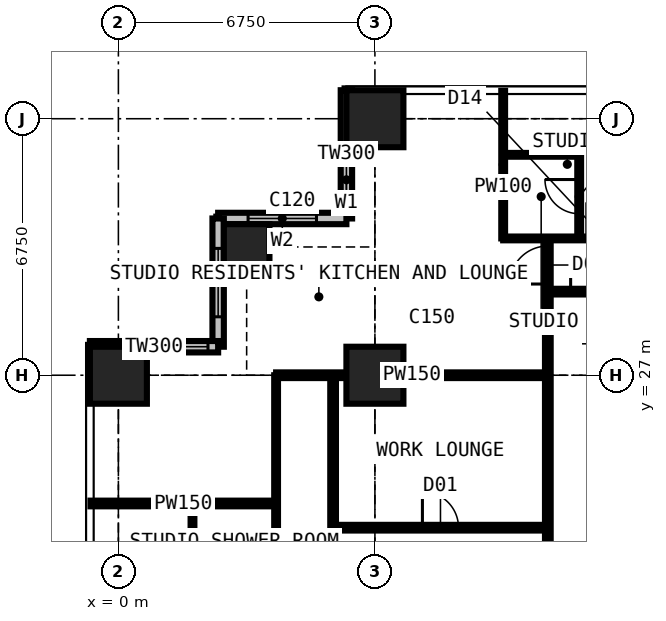
"""IFC4 building model, lengths in metres.
Left out: names, types, materials, properties, quantities, classifications, styles, units other than length and angle.
Written with IfcOpenShell. Run it as: python <this file> out.ifc"""

import sys

from ifc_helpers import new_model, si_unit, direction, frame, frame_2d, origin, origin_2d, place, context, subcontext, project, spatial, rectangle, extrude, element, fill, save


model = new_model("IFC4")
c1 = context("Model", 3, precision=1e-05, world=origin(), true_north=direction((0.0, 1.0)))
c2 = subcontext(c1, "Body", "Model", "MODEL_VIEW")
j1 = project(units=[si_unit("LENGTHUNIT", "METRE"), si_unit("PLANEANGLEUNIT", "RADIAN")], contexts=[c1])
p1 = place(None, origin())
s1 = spatial("IfcSite", under=j1, at=p1, CompositionType="ELEMENT")
p2 = place(p1, origin())
s2 = spatial("IfcBuilding", under=s1, at=p2, CompositionType="ELEMENT")
p3 = place(p2, frame((0.0, 0.0, 160.2)))
s3 = spatial("IfcBuildingStorey", under=s2, at=p3, CompositionType="ELEMENT", Elevation=160.2)
p4 = place(p3, frame((0.0, 27.0, 0.0), z_axis=(0.0, 0.0, 1.0), x_axis=(1.0, 0.0, 0.0)))
e1 = element("IfcColumn", 1, at=p4, inside=s3, PredefinedType="COLUMN", context=c2, shape_type="SweptSolid", body=[
    extrude(rectangle(XDim=1.5, YDim=1.5, at=origin_2d()), origin(), (0.0, 0.0, 1.0), 3.6),
])
p5 = place(p3, frame((3.375, 30.375, 0.0), z_axis=(0.0, 0.0, 1.0), x_axis=(1.0, 0.0, 0.0)))
e2 = element("IfcColumn", 2, at=p5, inside=s3, PredefinedType="COLUMN", context=c2, shape_type="SweptSolid", body=[
    extrude(rectangle(XDim=1.2, YDim=1.2, at=origin_2d()), origin(), (0.0, 0.0, 1.0), 3.6),
])
for number, where, z_axis, x_axis in (
    (3, (6.75, 27.0, 0.0), (0.0, 0.0, 1.0), (1.0, 0.0, 0.0)),
    (4, (6.75, 33.75, 0.0), (0.0, 0.0, 1.0), (1.0, 0.0, 0.0)),
):
    element("IfcColumn", number, at=place(p3, frame(where, z_axis=z_axis, x_axis=x_axis)), inside=s3, PredefinedType="COLUMN", context=c2, shape_type="SweptSolid", body=[
        extrude(rectangle(XDim=1.5, YDim=1.5, at=origin_2d()), origin(), (0.0, 0.0, 1.0), 3.6),
    ])
p6 = place(p3, frame((6.0, 34.5, 0.0), z_axis=(0.0, 0.0, 1.0), x_axis=(0.0, -1.0, 0.0)))
e5 = element("IfcWall", 5, at=p6, inside=s3, PredefinedType="SOLIDWALL", context=c2, shape_type="SweptSolid", body=[
    extrude(rectangle(XDim=3.375, YDim=0.3, at=frame_2d((1.688, 0.0))), origin(), (0.0, 0.0, 1.0), 3.375),
])
p7 = place(p6, frame((1.607, 0.0, 0.9)))
e6 = element("IfcOpeningElement", 6, at=p7, cuts=e5, PredefinedType="OPENING", context=c2, shape_type="SweptSolid", body=[
    extrude(rectangle(XDim=1.5, YDim=1.8, at=frame_2d((0.75, 0.9))), frame((0.0, 0.16, 0.0), z_axis=(0.0, -1.0, 0.0), x_axis=(1.0, 0.0, 0.0)), (0.0, 0.0, 1.0), 0.32),
])
p8 = place(p3, frame((6.0, 31.125, 0.0), z_axis=(0.0, 0.0, 1.0), x_axis=(-1.0, 0.0, 0.0)))
e7 = element("IfcWall", 7, at=p8, inside=s3, PredefinedType="SOLIDWALL", context=c2, shape_type="SweptSolid", body=[
    extrude(rectangle(XDim=3.375, YDim=0.3, at=frame_2d((1.688, 0.0))), origin(), (0.0, 0.0, 1.0), 3.375),
])
p9 = place(p8, frame((0.788, 0.0, 0.6)))
e8 = element("IfcOpeningElement", 8, at=p9, cuts=e7, PredefinedType="OPENING", context=c2, shape_type="SweptSolid", body=[
    extrude(rectangle(XDim=1.8, YDim=2.1, at=frame_2d((0.9, 1.05))), frame((0.0, 0.16, 0.0), z_axis=(0.0, -1.0, 0.0), x_axis=(1.0, 0.0, 0.0)), (0.0, 0.0, 1.0), 0.32),
])
p10 = place(p3, frame((2.625, 31.125, 0.0), z_axis=(0.0, 0.0, 1.0), x_axis=(0.0, -1.0, 0.0)))
e9 = element("IfcWall", 9, at=p10, inside=s3, PredefinedType="SOLIDWALL", context=c2, shape_type="SweptSolid", body=[
    extrude(rectangle(XDim=3.375, YDim=0.3, at=frame_2d((1.688, 0.0))), origin(), (0.0, 0.0, 1.0), 3.375),
])
p11 = place(p10, frame((0.788, 0.0, 0.6)))
e10 = element("IfcOpeningElement", 10, at=p11, cuts=e9, PredefinedType="OPENING", context=c2, shape_type="SweptSolid", body=[
    extrude(rectangle(XDim=1.8, YDim=2.1, at=frame_2d((0.9, 1.05))), frame((0.0, 0.16, 0.0), z_axis=(0.0, -1.0, 0.0), x_axis=(1.0, 0.0, 0.0)), (0.0, 0.0, 1.0), 0.32),
])
p12 = place(p3, frame((2.625, 27.75, 0.0), z_axis=(0.0, 0.0, 1.0), x_axis=(-1.0, 0.0, 0.0)))
e11 = element("IfcWall", 11, at=p12, inside=s3, PredefinedType="SOLIDWALL", context=c2, shape_type="SweptSolid", body=[
    extrude(rectangle(XDim=3.375, YDim=0.3, at=frame_2d((1.688, 0.0))), origin(), (0.0, 0.0, 1.0), 3.375),
])
p13 = place(p12, frame((0.268, 0.0, 0.9)))
e12 = element("IfcOpeningElement", 12, at=p13, cuts=e11, PredefinedType="OPENING", context=c2, shape_type="SweptSolid", body=[
    extrude(rectangle(XDim=1.5, YDim=1.8, at=frame_2d((0.75, 0.9))), frame((0.0, 0.16, 0.0), z_axis=(0.0, -1.0, 0.0), x_axis=(1.0, 0.0, 0.0)), (0.0, 0.0, 1.0), 0.32),
])
p14 = place(p3, frame((-0.734, 23.625, 0.0), z_axis=(0.0, 0.0, 1.0), x_axis=(1.0, 0.0, 0.0)))
e13 = element("IfcWall", 13, at=p14, inside=s3, PredefinedType="PARTITIONING", context=c2, shape_type="SweptSolid", body=[
    extrude(rectangle(XDim=4.884, YDim=0.15, at=frame_2d((2.442, 0.0))), origin(), (0.0, 0.0, 1.0), 3.375),
])
p15 = place(p3, frame((1.95, 21.625, 0.0), z_axis=(0.0, 0.0, 1.0), x_axis=(0.0, 1.0, 0.0)))
e14 = element("IfcWall", 14, at=p15, inside=s3, PredefinedType="PARTITIONING", context=c2, shape_type="SweptSolid", body=[
    extrude(rectangle(XDim=2.0, YDim=0.1, at=frame_2d((1.0, 0.0))), origin(), (0.0, 0.0, 1.0), 3.375),
])
p16 = place(p3, frame((4.15, 10.125, 0.0), z_axis=(0.0, 0.0, 1.0), x_axis=(0.0, 1.0, 0.0)))
e15 = element("IfcWall", 15, at=p16, inside=s3, PredefinedType="PARTITIONING", context=c2, shape_type="SweptSolid", body=[
    extrude(rectangle(XDim=16.875, YDim=0.1, at=frame_2d((8.438, 0.0))), origin(), (0.0, 0.0, 1.0), 3.375),
])
p17 = place(p16, frame((0.2, 0.0, 0.0)))
e16 = element("IfcOpeningElement", 16, at=p17, cuts=e15, PredefinedType="OPENING", context=c2, shape_type="SweptSolid", body=[
    extrude(rectangle(XDim=0.95, YDim=2.2, at=frame_2d((0.475, 1.1))), frame((0.0, 0.06, 0.0), z_axis=(0.0, -1.0, 0.0), x_axis=(1.0, 0.0, 0.0)), (0.0, 0.0, 1.0), 0.12),
])
p18 = place(p16, frame((3.625, 0.0, 0.0)))
e17 = element("IfcOpeningElement", 17, at=p18, cuts=e15, PredefinedType="OPENING", context=c2, shape_type="SweptSolid", body=[
    extrude(rectangle(XDim=0.95, YDim=2.2, at=frame_2d((0.475, 1.1))), frame((0.0, 0.06, 0.0), z_axis=(0.0, -1.0, 0.0), x_axis=(1.0, 0.0, 0.0)), (0.0, 0.0, 1.0), 0.12),
])
p19 = place(p16, frame((7.0, 0.0, 0.0)))
e18 = element("IfcOpeningElement", 18, at=p19, cuts=e15, PredefinedType="OPENING", context=c2, shape_type="SweptSolid", body=[
    extrude(rectangle(XDim=0.95, YDim=2.2, at=frame_2d((0.475, 1.1))), frame((0.0, 0.06, 0.0), z_axis=(0.0, -1.0, 0.0), x_axis=(1.0, 0.0, 0.0)), (0.0, 0.0, 1.0), 0.12),
])
p20 = place(p16, frame((10.375, 0.0, 0.0)))
e19 = element("IfcOpeningElement", 19, at=p20, cuts=e15, PredefinedType="OPENING", context=c2, shape_type="SweptSolid", body=[
    extrude(rectangle(XDim=0.95, YDim=2.2, at=frame_2d((0.475, 1.1))), frame((0.0, 0.06, 0.0), z_axis=(0.0, -1.0, 0.0), x_axis=(1.0, 0.0, 0.0)), (0.0, 0.0, 1.0), 0.12),
])
p21 = place(p3, frame((4.15, 27.0, 0.0), z_axis=(0.0, 0.0, 1.0), x_axis=(1.0, 0.0, 0.0)))
e20 = element("IfcWall", 20, at=p21, inside=s3, PredefinedType="PARTITIONING", context=c2, shape_type="SweptSolid", body=[
    extrude(rectangle(XDim=7.15, YDim=0.15, at=frame_2d((3.575, 0.0))), origin(), (0.0, 0.0, 1.0), 2.806),
])
p22 = place(p3, frame((5.65, 22.988, 0.0), z_axis=(0.0, 0.0, 1.0), x_axis=(0.0, 1.0, 0.0)))
e21 = element("IfcWall", 21, at=p22, inside=s3, PredefinedType="PARTITIONING", context=c2, shape_type="SweptSolid", body=[
    extrude(rectangle(XDim=4.012, YDim=0.15, at=frame_2d((2.006, 0.0))), origin(), (0.0, 0.0, 1.0), 3.375),
])
p23 = place(p3, frame((5.65, 22.988, 0.0), z_axis=(0.0, 0.0, 1.0), x_axis=(1.0, 0.0, 0.0)))
e22 = element("IfcWall", 22, at=p23, inside=s3, PredefinedType="PARTITIONING", context=c2, shape_type="SweptSolid", body=[
    extrude(rectangle(XDim=5.65, YDim=0.15, at=frame_2d((2.825, 0.0))), origin(), (0.0, 0.0, 1.0), 3.375),
])
p24 = place(p23, frame((2.35, 0.0, 0.0)))
e23 = element("IfcOpeningElement", 23, at=p24, cuts=e22, PredefinedType="OPENING", context=c2, shape_type="SweptSolid", body=[
    extrude(rectangle(XDim=0.95, YDim=2.2, at=frame_2d((0.475, 1.1))), frame((0.0, 0.085, 0.0), z_axis=(0.0, -1.0, 0.0), x_axis=(1.0, 0.0, 0.0)), (0.0, 0.0, 1.0), 0.17),
])
p25 = place(p3, frame((10.125, 30.6, 0.0), z_axis=(0.0, 0.0, 1.0), x_axis=(0.0, 1.0, 0.0)))
e24 = element("IfcWall", 24, at=p25, inside=s3, PredefinedType="PARTITIONING", context=c2, shape_type="SweptSolid", body=[
    extrude(rectangle(XDim=3.884, YDim=0.1, at=frame_2d((1.942, 0.0))), origin(), (0.0, 0.0, 1.0), 3.375),
])
p26 = place(p3, frame((10.125, 30.6, 0.0), z_axis=(0.0, 0.0, 1.0), x_axis=(1.0, 0.0, 0.0)))
e25 = element("IfcWall", 25, at=p26, inside=s3, PredefinedType="PARTITIONING", context=c2, shape_type="SweptSolid", body=[
    extrude(rectangle(XDim=3.375, YDim=0.1, at=frame_2d((1.688, 0.0))), origin(), (0.0, 0.0, 1.0), 3.375),
])
p27 = place(p26, frame((2.2, 0.0, 0.0)))
e26 = element("IfcOpeningElement", 26, at=p27, cuts=e25, PredefinedType="OPENING", context=c2, shape_type="SweptSolid", body=[
    extrude(rectangle(XDim=0.95, YDim=2.2, at=frame_2d((0.475, 1.1))), frame((0.0, 0.06, 0.0), z_axis=(0.0, -1.0, 0.0), x_axis=(1.0, 0.0, 0.0)), (0.0, 0.0, 1.0), 0.12),
])
p28 = place(p3, frame((10.125, 32.8, 0.0), z_axis=(0.0, 0.0, 1.0), x_axis=(1.0, 0.0, 0.0)))
e27 = element("IfcWall", 27, at=p28, inside=s3, PredefinedType="PARTITIONING", context=c2, shape_type="SweptSolid", body=[
    extrude(rectangle(XDim=2.0, YDim=0.1, at=frame_2d((1.0, 0.0))), origin(), (0.0, 0.0, 1.0), 3.375),
])
p29 = place(p3, frame((11.3, 11.3, 0.0), z_axis=(0.0, 0.0, 1.0), x_axis=(0.0, 1.0, 0.0)))
e28 = element("IfcWall", 28, at=p29, inside=s3, PredefinedType="PARTITIONING", context=c2, shape_type="SweptSolid", body=[
    extrude(rectangle(XDim=19.3, YDim=0.15, at=frame_2d((9.65, 0.0))), origin(), (0.0, 0.0, 1.0), 3.375),
])
p30 = place(p29, frame((18.1, 0.0, 0.0)))
e29 = element("IfcOpeningElement", 29, at=p30, cuts=e28, PredefinedType="OPENING", context=c2, shape_type="SweptSolid", body=[
    extrude(rectangle(XDim=1.0, YDim=2.2, at=frame_2d((0.5, 1.1))), frame((0.0, 0.085, 0.0), z_axis=(0.0, -1.0, 0.0), x_axis=(1.0, 0.0, 0.0)), (0.0, 0.0, 1.0), 0.17),
])
p31 = place(p29, frame((10.137, 0.0, 0.0)))
e30 = element("IfcOpeningElement", 30, at=p31, cuts=e28, PredefinedType="OPENING", context=c2, shape_type="SweptSolid", body=[
    extrude(rectangle(XDim=1.0, YDim=2.2, at=frame_2d((0.5, 1.1))), frame((0.0, 0.085, 0.0), z_axis=(0.0, -1.0, 0.0), x_axis=(1.0, 0.0, 0.0)), (0.0, 0.0, 1.0), 0.17),
])
p32 = place(p3, frame((11.3, 29.2, 0.0), z_axis=(0.0, 0.0, 1.0), x_axis=(1.0, 0.0, 0.0)))
e31 = element("IfcWall", 31, at=p32, inside=s3, PredefinedType="PARTITIONING", context=c2, shape_type="SweptSolid", body=[
    extrude(rectangle(XDim=19.809, YDim=0.15, at=frame_2d((9.904, 0.0))), origin(), (0.0, 0.0, 1.0), 3.375),
])
p33 = place(p32, frame((14.625, 0.0, 0.0)))
e32 = element("IfcOpeningElement", 32, at=p33, cuts=e31, PredefinedType="OPENING", context=c2, shape_type="SweptSolid", body=[
    extrude(rectangle(XDim=1.0, YDim=2.2, at=frame_2d((0.5, 1.1))), frame((0.0, 0.085, 0.0), z_axis=(0.0, -1.0, 0.0), x_axis=(1.0, 0.0, 0.0)), (0.0, 0.0, 1.0), 0.17),
])
p34 = place(p32, frame((5.825, 0.0, 0.0)))
e33 = element("IfcOpeningElement", 33, at=p34, cuts=e31, PredefinedType="OPENING", context=c2, shape_type="SweptSolid", body=[
    extrude(rectangle(XDim=0.95, YDim=2.2, at=frame_2d((0.475, 1.1))), frame((0.0, 0.085, 0.0), z_axis=(0.0, -1.0, 0.0), x_axis=(1.0, 0.0, 0.0)), (0.0, 0.0, 1.0), 0.17),
])
p35 = place(p32, frame((9.2, 0.0, 0.0)))
e34 = element("IfcOpeningElement", 34, at=p35, cuts=e31, PredefinedType="OPENING", context=c2, shape_type="SweptSolid", body=[
    extrude(rectangle(XDim=0.95, YDim=2.2, at=frame_2d((0.475, 1.1))), frame((0.0, 0.085, 0.0), z_axis=(0.0, -1.0, 0.0), x_axis=(1.0, 0.0, 0.0)), (0.0, 0.0, 1.0), 0.17),
])
p36 = place(p32, frame((0.6, 0.0, 0.0)))
e35 = element("IfcOpeningElement", 35, at=p36, cuts=e31, PredefinedType="OPENING", context=c2, shape_type="SweptSolid", body=[
    extrude(rectangle(XDim=1.0, YDim=2.2, at=frame_2d((0.5, 1.1))), frame((0.0, 0.085, 0.0), z_axis=(0.0, -1.0, 0.0), x_axis=(1.0, 0.0, 0.0)), (0.0, 0.0, 1.0), 0.17),
])
p37 = place(p3, frame((12.125, 30.6, 0.0), z_axis=(0.0, 0.0, 1.0), x_axis=(0.0, 1.0, 0.0)))
e36 = element("IfcWall", 36, at=p37, inside=s3, PredefinedType="PARTITIONING", context=c2, shape_type="SweptSolid", body=[
    extrude(rectangle(XDim=2.2, YDim=0.1, at=frame_2d((1.1, 0.0))), origin(), (0.0, 0.0, 1.0), 3.375),
])
p38 = place(p37, frame((0.65, 0.0, 0.0)))
e37 = element("IfcOpeningElement", 37, at=p38, cuts=e36, PredefinedType="OPENING", context=c2, shape_type="SweptSolid", body=[
    extrude(rectangle(XDim=0.9, YDim=2.2, at=frame_2d((0.45, 1.1))), frame((0.0, 0.06, 0.0), z_axis=(0.0, -1.0, 0.0), x_axis=(1.0, 0.0, 0.0)), (0.0, 0.0, 1.0), 0.12),
])
p39 = place(p7, origin())
e38 = element("IfcWindow", 38, at=p39, inside=s3, PartitioningType="SINGLE_PANEL", PredefinedType="WINDOW", context=c2, shape_type="SweptSolid", body=[
    extrude(rectangle(XDim=1.5, YDim=1.8, at=frame_2d((0.75, 0.9))), frame((0.0, 0.03, 0.0), z_axis=(0.0, -1.0, 0.0), x_axis=(1.0, 0.0, 0.0)), (0.0, 0.0, 1.0), 0.06),
])
fill(e6, e38)
p40 = place(p9, origin())
e39 = element("IfcWindow", 39, at=p40, inside=s3, PartitioningType="SINGLE_PANEL", PredefinedType="WINDOW", context=c2, shape_type="SweptSolid", body=[
    extrude(rectangle(XDim=1.8, YDim=2.1, at=frame_2d((0.9, 1.05))), frame((0.0, 0.03, 0.0), z_axis=(0.0, -1.0, 0.0), x_axis=(1.0, 0.0, 0.0)), (0.0, 0.0, 1.0), 0.06),
])
fill(e8, e39)
p41 = place(p11, origin())
e40 = element("IfcWindow", 40, at=p41, inside=s3, PartitioningType="SINGLE_PANEL", PredefinedType="WINDOW", context=c2, shape_type="SweptSolid", body=[
    extrude(rectangle(XDim=1.8, YDim=2.1, at=frame_2d((0.9, 1.05))), frame((0.0, 0.03, 0.0), z_axis=(0.0, -1.0, 0.0), x_axis=(1.0, 0.0, 0.0)), (0.0, 0.0, 1.0), 0.06),
])
fill(e10, e40)
p42 = place(p13, origin())
e41 = element("IfcWindow", 41, at=p42, inside=s3, PartitioningType="SINGLE_PANEL", PredefinedType="WINDOW", context=c2, shape_type="SweptSolid", body=[
    extrude(rectangle(XDim=1.5, YDim=1.8, at=frame_2d((0.75, 0.9))), frame((0.0, 0.03, 0.0), z_axis=(0.0, -1.0, 0.0), x_axis=(1.0, 0.0, 0.0)), (0.0, 0.0, 1.0), 0.06),
])
fill(e12, e41)
p43 = place(p38, origin())
e42 = element("IfcDoor", 42, at=p43, inside=s3, OperationType="SINGLE_SWING_RIGHT", PredefinedType="DOOR", context=c2, shape_type="SweptSolid", body=[
    extrude(rectangle(XDim=0.9, YDim=2.2, at=frame_2d((0.45, 1.1))), frame((0.0, 0.025, 0.0), z_axis=(0.0, -1.0, 0.0), x_axis=(1.0, 0.0, 0.0)), (0.0, 0.0, 1.0), 0.05),
])
fill(e37, e42)
p44 = place(p36, origin())
e43 = element("IfcDoor", 43, at=p44, inside=s3, OperationType="SINGLE_SWING_LEFT", PredefinedType="DOOR", context=c2, shape_type="SweptSolid", body=[
    extrude(rectangle(XDim=1.0, YDim=2.2, at=frame_2d((0.5, 1.1))), frame((0.0, 0.025, 0.0), z_axis=(0.0, -1.0, 0.0), x_axis=(1.0, 0.0, 0.0)), (0.0, 0.0, 1.0), 0.05),
])
fill(e35, e43)
p45 = place(p30, origin())
e44 = element("IfcDoor", 44, at=p45, inside=s3, OperationType="SINGLE_SWING_LEFT", PredefinedType="DOOR", context=c2, shape_type="SweptSolid", body=[
    extrude(rectangle(XDim=1.0, YDim=2.2, at=frame_2d((0.5, 1.1))), frame((0.0, 0.025, 0.0), z_axis=(0.0, -1.0, 0.0), x_axis=(1.0, 0.0, 0.0)), (0.0, 0.0, 1.0), 0.05),
])
fill(e29, e44)
p46 = place(p24, origin())
e45 = element("IfcDoor", 45, at=p46, inside=s3, OperationType="SINGLE_SWING_LEFT", PredefinedType="DOOR", context=c2, shape_type="SweptSolid", body=[
    extrude(rectangle(XDim=0.95, YDim=2.2, at=frame_2d((0.475, 1.1))), frame((0.0, 0.025, 0.0), z_axis=(0.0, -1.0, 0.0), x_axis=(1.0, 0.0, 0.0)), (0.0, 0.0, 1.0), 0.05),
])
fill(e23, e45)
save(model, sys.argv[1])
